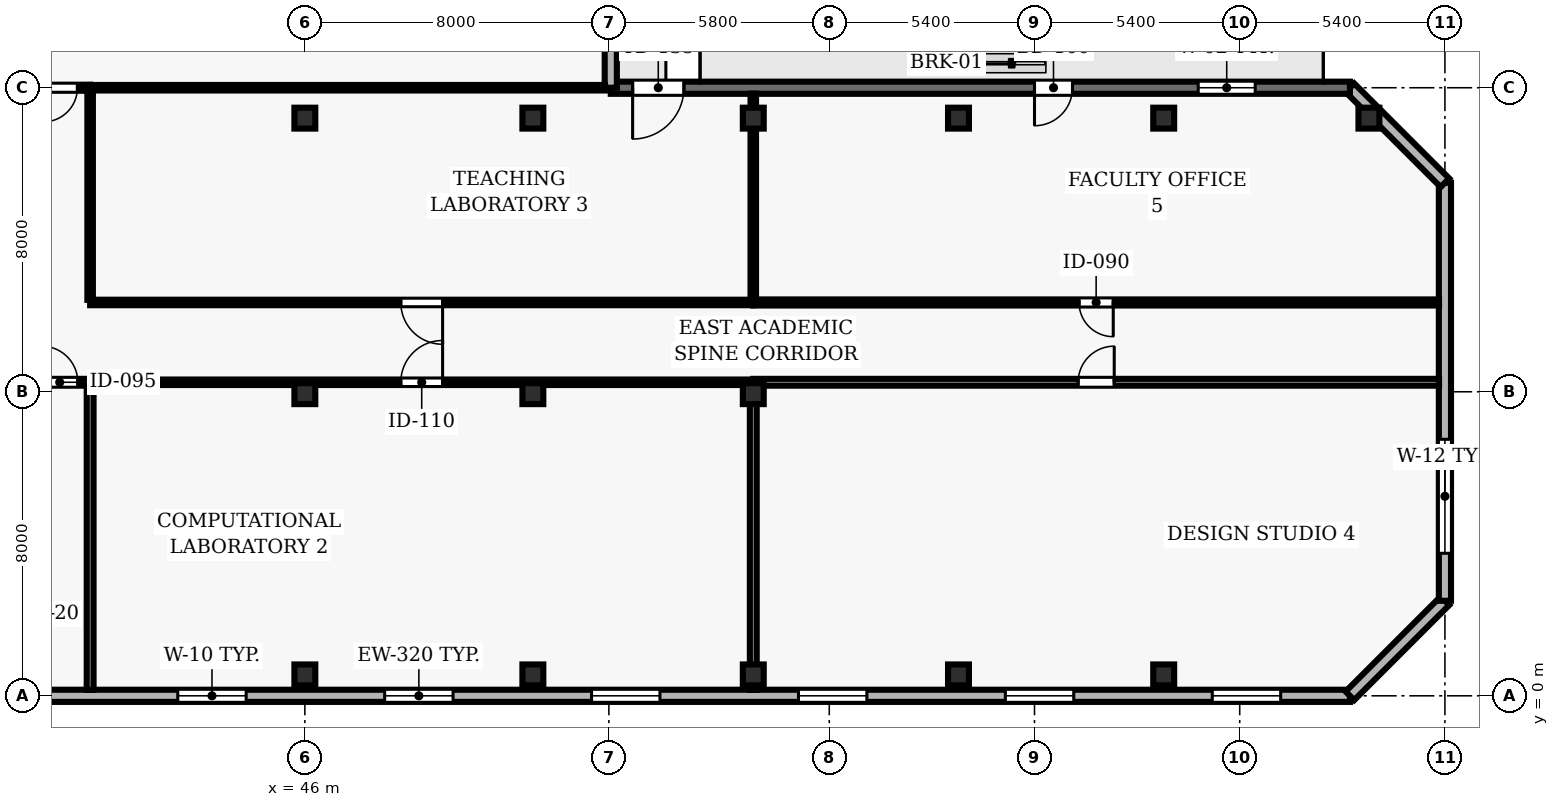
"""IFC4 building model, lengths in metres.
Left out: names, types, materials, properties, quantities, classifications, styles, units other than length and angle.
Written with IfcOpenShell. Run it as: python <this file> out.ifc"""

import sys

from ifc_helpers import new_model, si_unit, direction, frame, frame_2d, origin, origin_2d, place, context, subcontext, project, spatial, rectangle, hollow_rectangle, extrude, element, fill, save


model = new_model("IFC4")
c1 = context("Model", 3, precision=1e-05, world=origin(), true_north=direction((0.0, 1.0)))
c2 = subcontext(c1, "Body", "Model", "MODEL_VIEW")
j1 = project(units=[si_unit("LENGTHUNIT", "METRE"), si_unit("PLANEANGLEUNIT", "RADIAN")], contexts=[c1])
p1 = place(None, origin())
s1 = spatial("IfcSite", under=j1, at=p1, CompositionType="ELEMENT")
p2 = place(p1, origin())
s2 = spatial("IfcBuilding", under=s1, at=p2, CompositionType="ELEMENT")
p3 = place(p2, frame((0.0, 0.0, 42.7)))
s3 = spatial("IfcBuildingStorey", under=s2, at=p3, CompositionType="ELEMENT", Elevation=42.7)
for number, where, z_axis, x_axis in (
    (1, (46.0, 0.55, 0.0), (0.0, 0.0, 1.0), (1.0, 0.0, 0.0)),
    (2, (46.0, 7.95, 0.0), (0.0, 0.0, 1.0), (1.0, 0.0, 0.0)),
    (3, (46.0, 15.2, 0.0), (0.0, 0.0, 1.0), (1.0, 0.0, 0.0)),
    (4, (52.0, 0.55, 0.0), (0.0, 0.0, 1.0), (1.0, 0.0, 0.0)),
    (5, (52.0, 7.95, 0.0), (0.0, 0.0, 1.0), (1.0, 0.0, 0.0)),
    (6, (52.0, 15.2, 0.0), (0.0, 0.0, 1.0), (1.0, 0.0, 0.0)),
    (7, (57.8, 0.55, 0.0), (0.0, 0.0, 1.0), (1.0, 0.0, 0.0)),
    (8, (57.8, 7.95, 0.0), (0.0, 0.0, 1.0), (1.0, 0.0, 0.0)),
    (9, (57.8, 15.2, 0.0), (0.0, 0.0, 1.0), (1.0, 0.0, 0.0)),
    (10, (63.2, 0.55, 0.0), (0.0, 0.0, 1.0), (1.0, 0.0, 0.0)),
    (11, (63.2, 15.2, 0.0), (0.0, 0.0, 1.0), (1.0, 0.0, 0.0)),
    (12, (68.6, 0.55, 0.0), (0.0, 0.0, 1.0), (1.0, 0.0, 0.0)),
    (13, (68.6, 15.2, 0.0), (0.0, 0.0, 1.0), (1.0, 0.0, 0.0)),
    (14, (74.0, 15.2, 0.0), (0.0, 0.0, 1.0), (1.0, 0.0, 0.0)),
):
    element("IfcColumn", number, at=place(p3, frame(where, z_axis=z_axis, x_axis=x_axis)), inside=s3, PredefinedType="COLUMN", context=c2, shape_type="SweptSolid", body=[
        extrude(hollow_rectangle(XDim=0.55, YDim=0.55, WallThickness=0.025, at=origin_2d()), origin(), (0.0, 0.0, 1.0), 3.9),
    ])
p4 = place(p3, frame((24.5, 0.0, 0.0), z_axis=(0.0, 0.0, 1.0), x_axis=(1.0, 0.0, 0.0)))
e15 = element("IfcWall", 15, at=p4, inside=s3, PredefinedType="SOLIDWALL", context=c2, shape_type="SweptSolid", body=[
    extrude(rectangle(XDim=49.0, YDim=0.32, at=frame_2d((24.5, 0.0))), origin(), (0.0, 0.0, 1.0), 3.69),
])
p5 = place(p4, frame((1.822, 0.0, 0.9)))
e16 = element("IfcOpeningElement", 16, at=p5, cuts=e15, PredefinedType="OPENING", context=c2, shape_type="SweptSolid", body=[
    extrude(rectangle(XDim=1.8, YDim=2.2, at=frame_2d((0.9, 1.1))), frame((0.0, 0.17, 0.0), z_axis=(0.0, -1.0, 0.0), x_axis=(1.0, 0.0, 0.0)), (0.0, 0.0, 1.0), 0.34),
])
p6 = place(p4, frame((18.156, 0.0, 0.9)))
e17 = element("IfcOpeningElement", 17, at=p6, cuts=e15, PredefinedType="OPENING", context=c2, shape_type="SweptSolid", body=[
    extrude(rectangle(XDim=1.8, YDim=2.2, at=frame_2d((0.9, 1.1))), frame((0.0, 0.17, 0.0), z_axis=(0.0, -1.0, 0.0), x_axis=(1.0, 0.0, 0.0)), (0.0, 0.0, 1.0), 0.34),
])
p7 = place(p4, frame((23.6, 0.0, 0.9)))
e18 = element("IfcOpeningElement", 18, at=p7, cuts=e15, PredefinedType="OPENING", context=c2, shape_type="SweptSolid", body=[
    extrude(rectangle(XDim=1.8, YDim=2.2, at=frame_2d((0.9, 1.1))), frame((0.0, 0.17, 0.0), z_axis=(0.0, -1.0, 0.0), x_axis=(1.0, 0.0, 0.0)), (0.0, 0.0, 1.0), 0.34),
])
p8 = place(p4, frame((29.044, 0.0, 0.9)))
e19 = element("IfcOpeningElement", 19, at=p8, cuts=e15, PredefinedType="OPENING", context=c2, shape_type="SweptSolid", body=[
    extrude(rectangle(XDim=1.8, YDim=2.2, at=frame_2d((0.9, 1.1))), frame((0.0, 0.17, 0.0), z_axis=(0.0, -1.0, 0.0), x_axis=(1.0, 0.0, 0.0)), (0.0, 0.0, 1.0), 0.34),
])
p9 = place(p4, frame((34.489, 0.0, 0.9)))
e20 = element("IfcOpeningElement", 20, at=p9, cuts=e15, PredefinedType="OPENING", context=c2, shape_type="SweptSolid", body=[
    extrude(rectangle(XDim=1.8, YDim=2.2, at=frame_2d((0.9, 1.1))), frame((0.0, 0.17, 0.0), z_axis=(0.0, -1.0, 0.0), x_axis=(1.0, 0.0, 0.0)), (0.0, 0.0, 1.0), 0.34),
])
p10 = place(p4, frame((39.933, 0.0, 0.9)))
e21 = element("IfcOpeningElement", 21, at=p10, cuts=e15, PredefinedType="OPENING", context=c2, shape_type="SweptSolid", body=[
    extrude(rectangle(XDim=1.8, YDim=2.2, at=frame_2d((0.9, 1.1))), frame((0.0, 0.17, 0.0), z_axis=(0.0, -1.0, 0.0), x_axis=(1.0, 0.0, 0.0)), (0.0, 0.0, 1.0), 0.34),
])
p11 = place(p4, frame((45.378, 0.0, 0.9)))
e22 = element("IfcOpeningElement", 22, at=p11, cuts=e15, PredefinedType="OPENING", context=c2, shape_type="SweptSolid", body=[
    extrude(rectangle(XDim=1.8, YDim=2.2, at=frame_2d((0.9, 1.1))), frame((0.0, 0.17, 0.0), z_axis=(0.0, -1.0, 0.0), x_axis=(1.0, 0.0, 0.0)), (0.0, 0.0, 1.0), 0.34),
])
p12 = place(p3, frame((73.5, 0.0, 0.0), z_axis=(0.0, 0.0, 1.0), x_axis=(0.707106781187, 0.707106781187, 0.0)))
e23 = element("IfcWall", 23, at=p12, inside=s3, PredefinedType="SOLIDWALL", context=c2, shape_type="SweptSolid", body=[
    extrude(rectangle(XDim=3.536, YDim=0.32, at=frame_2d((1.768, 0.0))), origin(), (0.0, 0.0, 1.0), 3.69),
])
p13 = place(p3, frame((76.0, 2.5, 0.0), z_axis=(0.0, 0.0, 1.0), x_axis=(0.0, 1.0, 0.0)))
e24 = element("IfcWall", 24, at=p13, inside=s3, PredefinedType="SOLIDWALL", context=c2, shape_type="SweptSolid", body=[
    extrude(rectangle(XDim=11.0, YDim=0.32, at=frame_2d((5.5, 0.0))), origin(), (0.0, 0.0, 1.0), 3.69),
])
p14 = place(p13, frame((1.25, 0.0, 0.9)))
e25 = element("IfcOpeningElement", 25, at=p14, cuts=e24, PredefinedType="OPENING", context=c2, shape_type="SweptSolid", body=[
    extrude(rectangle(XDim=3.0, YDim=2.2, at=frame_2d((1.5, 1.1))), frame((0.0, 0.17, 0.0), z_axis=(0.0, -1.0, 0.0), x_axis=(1.0, 0.0, 0.0)), (0.0, 0.0, 1.0), 0.34),
])
p15 = place(p3, frame((76.0, 13.5, 0.0), z_axis=(0.0, 0.0, 1.0), x_axis=(-0.707106781187, 0.707106781187, 0.0)))
e26 = element("IfcWall", 26, at=p15, inside=s3, PredefinedType="SOLIDWALL", context=c2, shape_type="SweptSolid", body=[
    extrude(rectangle(XDim=3.536, YDim=0.32, at=frame_2d((1.768, 0.0))), origin(), (0.0, 0.0, 1.0), 3.69),
])
p16 = place(p3, frame((73.5, 16.0, 0.0), z_axis=(0.0, 0.0, 1.0), x_axis=(-1.0, 0.0, 0.0)))
e27 = element("IfcWall", 27, at=p16, inside=s3, PredefinedType="SOLIDWALL", context=c2, shape_type="SweptSolid", body=[
    extrude(rectangle(XDim=19.45, YDim=0.32, at=frame_2d((9.725, 0.0))), origin(), (0.0, 0.0, 1.0), 3.69),
])
p17 = place(p16, frame((7.3, 0.0, 0.0)))
e28 = element("IfcOpeningElement", 28, at=p17, cuts=e27, PredefinedType="OPENING", context=c2, shape_type="SweptSolid", body=[
    extrude(rectangle(XDim=1.0, YDim=2.2, at=frame_2d((0.5, 1.1))), frame((0.0, 0.17, 0.0), z_axis=(0.0, -1.0, 0.0), x_axis=(1.0, 0.0, 0.0)), (0.0, 0.0, 1.0), 0.34),
])
p18 = place(p16, frame((17.525, 0.0, 0.0)))
e29 = element("IfcOpeningElement", 29, at=p18, cuts=e27, PredefinedType="OPENING", context=c2, shape_type="SweptSolid", body=[
    extrude(rectangle(XDim=1.35, YDim=2.2, at=frame_2d((0.675, 1.1))), frame((0.0, 0.17, 0.0), z_axis=(0.0, -1.0, 0.0), x_axis=(1.0, 0.0, 0.0)), (0.0, 0.0, 1.0), 0.34),
])
p19 = place(p16, frame((2.492, 0.0, 0.9)))
e30 = element("IfcOpeningElement", 30, at=p19, cuts=e27, PredefinedType="OPENING", context=c2, shape_type="SweptSolid", body=[
    extrude(rectangle(XDim=1.5, YDim=1.6, at=frame_2d((0.75, 0.8))), frame((0.0, 0.17, 0.0), z_axis=(0.0, -1.0, 0.0), x_axis=(1.0, 0.0, 0.0)), (0.0, 0.0, 1.0), 0.34),
])
p20 = place(p3, frame((54.05, 16.0, 0.0), z_axis=(0.0, 0.0, 1.0), x_axis=(0.0, 1.0, 0.0)))
e31 = element("IfcWall", 31, at=p20, inside=s3, PredefinedType="SOLIDWALL", context=c2, shape_type="SweptSolid", body=[
    extrude(rectangle(XDim=10.747, YDim=0.32, at=frame_2d((5.374, 0.0))), origin(), (0.0, 0.0, 1.0), 3.69),
])
p21 = place(p20, frame((4.473, 0.0, 0.9)))
e32 = element("IfcOpeningElement", 32, at=p21, cuts=e31, PredefinedType="OPENING", context=c2, shape_type="SweptSolid", body=[
    extrude(rectangle(XDim=1.8, YDim=1.6, at=frame_2d((0.9, 0.8))), frame((0.0, 0.17, 0.0), z_axis=(0.0, -1.0, 0.0), x_axis=(1.0, 0.0, 0.0)), (0.0, 0.0, 1.0), 0.34),
])
p22 = place(p3, frame((38.05, 8.25, 0.0), z_axis=(0.0, 0.0, 1.0), x_axis=(1.0, 0.0, 0.0)))
e33 = element("IfcWall", 33, at=p22, inside=s3, PredefinedType="PARTITIONING", context=c2, shape_type="SweptSolid", body=[
    extrude(rectangle(XDim=2.3, YDim=0.18, at=frame_2d((1.15, 0.0))), origin(), (0.0, 0.0, 1.0), 3.055),
])
p23 = place(p22, frame((1.025, 0.0, 0.0)))
e34 = element("IfcOpeningElement", 34, at=p23, cuts=e33, PredefinedType="OPENING", context=c2, shape_type="SweptSolid", body=[
    extrude(rectangle(XDim=0.95, YDim=2.1, at=frame_2d((0.475, 1.05))), frame((0.0, 0.1, 0.0), z_axis=(0.0, -1.0, 0.0), x_axis=(1.0, 0.0, 0.0)), (0.0, 0.0, 1.0), 0.2),
])
p24 = place(p3, frame((40.35, 8.25, 0.0), z_axis=(0.0, 0.0, 1.0), x_axis=(1.0, 0.0, 0.0)))
e35 = element("IfcWall", 35, at=p24, inside=s3, PredefinedType="PARTITIONING", context=c2, shape_type="SweptSolid", body=[
    extrude(rectangle(XDim=17.45, YDim=0.145, at=frame_2d((8.725, 0.0))), origin(), (0.0, 0.0, 1.0), 3.055),
])
p25 = place(p24, frame((8.175, 0.0, 0.0)))
e36 = element("IfcOpeningElement", 36, at=p25, cuts=e35, PredefinedType="OPENING", context=c2, shape_type="SweptSolid", body=[
    extrude(rectangle(XDim=1.1, YDim=2.15, at=frame_2d((0.55, 1.075))), frame((0.0, 0.083, 0.0), z_axis=(0.0, -1.0, 0.0), x_axis=(1.0, 0.0, 0.0)), (0.0, 0.0, 1.0), 0.165),
])
p26 = place(p3, frame((40.35, 16.0, 0.0), z_axis=(0.0, 0.0, 1.0), x_axis=(1.0, 0.0, 0.0)))
e37 = element("IfcWall", 37, at=p26, inside=s3, PredefinedType="PARTITIONING", context=c2, shape_type="SweptSolid", body=[
    extrude(rectangle(XDim=13.545, YDim=0.145, at=frame_2d((6.772, 0.0))), origin(), (0.0, 0.0, 1.0), 3.39),
])
p27 = place(p3, frame((40.35, 16.0, 0.0), z_axis=(0.0, 0.0, 1.0), x_axis=(-1.0, 0.0, 0.0)))
e38 = element("IfcWall", 38, at=p27, inside=s3, PredefinedType="PARTITIONING", context=c2, shape_type="SweptSolid", body=[
    extrude(rectangle(XDim=2.27, YDim=0.16, at=frame_2d((1.135, 0.0))), origin(), (0.0, 0.0, 1.0), 3.69),
])
p28 = place(p27, frame((0.335, 0.0, 0.0)))
e39 = element("IfcOpeningElement", 39, at=p28, cuts=e38, PredefinedType="OPENING", context=c2, shape_type="SweptSolid", body=[
    extrude(rectangle(XDim=0.9, YDim=2.1, at=frame_2d((0.45, 1.05))), frame((0.0, 0.09, 0.0), z_axis=(0.0, -1.0, 0.0), x_axis=(1.0, 0.0, 0.0)), (0.0, 0.0, 1.0), 0.18),
])
p29 = place(p3, frame((57.8, 8.25, 0.0), z_axis=(0.0, 0.0, 1.0), x_axis=(1.0, 0.0, 0.0)))
e40 = element("IfcWall", 40, at=p29, inside=s3, PredefinedType="PARTITIONING", context=c2, shape_type="SweptSolid", body=[
    extrude(rectangle(XDim=18.045, YDim=0.18, at=frame_2d((9.022, 0.0))), origin(), (0.0, 0.0, 1.0), 3.69),
])
p30 = place(p29, frame((8.548, 0.0, 0.0)))
e41 = element("IfcOpeningElement", 41, at=p30, cuts=e40, PredefinedType="OPENING", context=c2, shape_type="SweptSolid", body=[
    extrude(rectangle(XDim=0.95, YDim=2.1, at=frame_2d((0.475, 1.05))), frame((0.0, 0.1, 0.0), z_axis=(0.0, -1.0, 0.0), x_axis=(1.0, 0.0, 0.0)), (0.0, 0.0, 1.0), 0.2),
])
p31 = place(p3, frame((57.8, 10.35, 0.0), z_axis=(0.0, 0.0, 1.0), x_axis=(-1.0, 0.0, 0.0)))
e42 = element("IfcWall", 42, at=p31, inside=s3, PredefinedType="PARTITIONING", context=c2, shape_type="SweptSolid", body=[
    extrude(rectangle(XDim=17.45, YDim=0.145, at=frame_2d((8.725, 0.0))), origin(), (0.0, 0.0, 1.0), 3.277),
])
p32 = place(p31, frame((8.175, 0.0, 0.0)))
e43 = element("IfcOpeningElement", 43, at=p32, cuts=e42, PredefinedType="OPENING", context=c2, shape_type="SweptSolid", body=[
    extrude(rectangle(XDim=1.1, YDim=2.15, at=frame_2d((0.55, 1.075))), frame((0.0, 0.083, 0.0), z_axis=(0.0, -1.0, 0.0), x_axis=(1.0, 0.0, 0.0)), (0.0, 0.0, 1.0), 0.165),
])
p33 = place(p3, frame((75.845, 10.35, 0.0), z_axis=(0.0, 0.0, 1.0), x_axis=(-1.0, 0.0, 0.0)))
e44 = element("IfcWall", 44, at=p33, inside=s3, PredefinedType="PARTITIONING", context=c2, shape_type="SweptSolid", body=[
    extrude(rectangle(XDim=18.045, YDim=0.16, at=frame_2d((9.022, 0.0))), origin(), (0.0, 0.0, 1.0), 3.277),
])
p34 = place(p33, frame((8.573, 0.0, 0.0)))
e45 = element("IfcOpeningElement", 45, at=p34, cuts=e44, PredefinedType="OPENING", context=c2, shape_type="SweptSolid", body=[
    extrude(rectangle(XDim=0.9, YDim=2.1, at=frame_2d((0.45, 1.05))), frame((0.0, 0.09, 0.0), z_axis=(0.0, -1.0, 0.0), x_axis=(1.0, 0.0, 0.0)), (0.0, 0.0, 1.0), 0.18),
])
p35 = place(p3, frame((40.35, 0.155, 0.0), z_axis=(0.0, 0.0, 1.0), x_axis=(0.0, 1.0, 0.0)))
e46 = element("IfcWall", 46, at=p35, inside=s3, PredefinedType="PARTITIONING", context=c2, shape_type="SweptSolid", body=[
    extrude(rectangle(XDim=8.01, YDim=0.18, at=frame_2d((4.005, 0.0))), origin(), (0.0, 0.0, 1.0), 3.69),
])
p36 = place(p3, frame((40.35, 10.418, 0.0), z_axis=(0.0, 0.0, 1.0), x_axis=(0.0, 1.0, 0.0)))
e47 = element("IfcWall", 47, at=p36, inside=s3, PredefinedType="PARTITIONING", context=c2, shape_type="SweptSolid", body=[
    extrude(rectangle(XDim=5.507, YDim=0.145, at=frame_2d((2.753, 0.0))), origin(), (0.0, 0.0, 1.0), 3.277),
])
p37 = place(p3, frame((57.8, 0.155, 0.0), z_axis=(0.0, 0.0, 1.0), x_axis=(0.0, 1.0, 0.0)))
e48 = element("IfcWall", 48, at=p37, inside=s3, PredefinedType="PARTITIONING", context=c2, shape_type="SweptSolid", body=[
    extrude(rectangle(XDim=8.01, YDim=0.18, at=frame_2d((4.005, 0.0))), origin(), (0.0, 0.0, 1.0), 3.055),
])
p38 = place(p3, frame((57.8, 10.425, 0.0), z_axis=(0.0, 0.0, 1.0), x_axis=(0.0, 1.0, 0.0)))
e49 = element("IfcWall", 49, at=p38, inside=s3, PredefinedType="PARTITIONING", context=c2, shape_type="SweptSolid", body=[
    extrude(rectangle(XDim=5.42, YDim=0.145, at=frame_2d((2.71, 0.0))), origin(), (0.0, 0.0, 1.0), 3.055),
])
p39 = place(p6, origin())
e50 = element("IfcWindow", 50, at=p39, inside=s3, PartitioningType="SINGLE_PANEL", PredefinedType="WINDOW", context=c2, shape_type="SweptSolid", body=[
    extrude(rectangle(XDim=1.8, YDim=2.2, at=frame_2d((0.9, 1.1))), frame((0.0, 0.03, 0.0), z_axis=(0.0, -1.0, 0.0), x_axis=(1.0, 0.0, 0.0)), (0.0, 0.0, 1.0), 0.06),
])
fill(e17, e50)
p40 = place(p7, origin())
e51 = element("IfcWindow", 51, at=p40, inside=s3, PartitioningType="SINGLE_PANEL", PredefinedType="WINDOW", context=c2, shape_type="SweptSolid", body=[
    extrude(rectangle(XDim=1.8, YDim=2.2, at=frame_2d((0.9, 1.1))), frame((0.0, 0.03, 0.0), z_axis=(0.0, -1.0, 0.0), x_axis=(1.0, 0.0, 0.0)), (0.0, 0.0, 1.0), 0.06),
])
fill(e18, e51)
p41 = place(p8, origin())
e52 = element("IfcWindow", 52, at=p41, inside=s3, PartitioningType="SINGLE_PANEL", PredefinedType="WINDOW", context=c2, shape_type="SweptSolid", body=[
    extrude(rectangle(XDim=1.8, YDim=2.2, at=frame_2d((0.9, 1.1))), frame((0.0, 0.03, 0.0), z_axis=(0.0, -1.0, 0.0), x_axis=(1.0, 0.0, 0.0)), (0.0, 0.0, 1.0), 0.06),
])
fill(e19, e52)
p42 = place(p9, origin())
e53 = element("IfcWindow", 53, at=p42, inside=s3, PartitioningType="SINGLE_PANEL", PredefinedType="WINDOW", context=c2, shape_type="SweptSolid", body=[
    extrude(rectangle(XDim=1.8, YDim=2.2, at=frame_2d((0.9, 1.1))), frame((0.0, 0.03, 0.0), z_axis=(0.0, -1.0, 0.0), x_axis=(1.0, 0.0, 0.0)), (0.0, 0.0, 1.0), 0.06),
])
fill(e20, e53)
p43 = place(p10, origin())
e54 = element("IfcWindow", 54, at=p43, inside=s3, PartitioningType="SINGLE_PANEL", PredefinedType="WINDOW", context=c2, shape_type="SweptSolid", body=[
    extrude(rectangle(XDim=1.8, YDim=2.2, at=frame_2d((0.9, 1.1))), frame((0.0, 0.03, 0.0), z_axis=(0.0, -1.0, 0.0), x_axis=(1.0, 0.0, 0.0)), (0.0, 0.0, 1.0), 0.06),
])
fill(e21, e54)
p44 = place(p11, origin())
e55 = element("IfcWindow", 55, at=p44, inside=s3, PartitioningType="SINGLE_PANEL", PredefinedType="WINDOW", context=c2, shape_type="SweptSolid", body=[
    extrude(rectangle(XDim=1.8, YDim=2.2, at=frame_2d((0.9, 1.1))), frame((0.0, 0.03, 0.0), z_axis=(0.0, -1.0, 0.0), x_axis=(1.0, 0.0, 0.0)), (0.0, 0.0, 1.0), 0.06),
])
fill(e22, e55)
p45 = place(p14, origin())
e56 = element("IfcWindow", 56, at=p45, inside=s3, PartitioningType="SINGLE_PANEL", PredefinedType="WINDOW", context=c2, shape_type="SweptSolid", body=[
    extrude(rectangle(XDim=3.0, YDim=2.2, at=frame_2d((1.5, 1.1))), frame((0.0, 0.03, 0.0), z_axis=(0.0, -1.0, 0.0), x_axis=(1.0, 0.0, 0.0)), (0.0, 0.0, 1.0), 0.06),
])
fill(e25, e56)
p46 = place(p17, origin())
e57 = element("IfcDoor", 57, at=p46, inside=s3, OperationType="SINGLE_SWING_RIGHT", PredefinedType="DOOR", context=c2, shape_type="SweptSolid", body=[
    extrude(rectangle(XDim=1.0, YDim=2.2, at=frame_2d((0.5, 1.1))), frame((0.0, 0.025, 0.0), z_axis=(0.0, -1.0, 0.0), x_axis=(1.0, 0.0, 0.0)), (0.0, 0.0, 1.0), 0.05),
])
fill(e28, e57)
p47 = place(p18, origin())
e58 = element("IfcDoor", 58, at=p47, inside=s3, OperationType="SINGLE_SWING_RIGHT", PredefinedType="DOOR", context=c2, shape_type="SweptSolid", body=[
    extrude(rectangle(XDim=1.35, YDim=2.2, at=frame_2d((0.675, 1.1))), frame((0.0, 0.025, 0.0), z_axis=(0.0, -1.0, 0.0), x_axis=(1.0, 0.0, 0.0)), (0.0, 0.0, 1.0), 0.05),
])
fill(e29, e58)
p48 = place(p19, origin())
e59 = element("IfcWindow", 59, at=p48, inside=s3, PartitioningType="SINGLE_PANEL", PredefinedType="WINDOW", context=c2, shape_type="SweptSolid", body=[
    extrude(rectangle(XDim=1.5, YDim=1.6, at=frame_2d((0.75, 0.8))), frame((0.0, 0.03, 0.0), z_axis=(0.0, -1.0, 0.0), x_axis=(1.0, 0.0, 0.0)), (0.0, 0.0, 1.0), 0.06),
])
fill(e30, e59)
p49 = place(p23, origin())
e60 = element("IfcDoor", 60, at=p49, inside=s3, OperationType="SINGLE_SWING_LEFT", PredefinedType="DOOR", context=c2, shape_type="SweptSolid", body=[
    extrude(rectangle(XDim=0.95, YDim=2.1, at=frame_2d((0.475, 1.05))), frame((0.0, 0.025, 0.0), z_axis=(0.0, -1.0, 0.0), x_axis=(1.0, 0.0, 0.0)), (0.0, 0.0, 1.0), 0.05),
])
fill(e34, e60)
p50 = place(p25, origin())
e61 = element("IfcDoor", 61, at=p50, inside=s3, OperationType="SINGLE_SWING_RIGHT", PredefinedType="DOOR", context=c2, shape_type="SweptSolid", body=[
    extrude(rectangle(XDim=1.1, YDim=2.15, at=frame_2d((0.55, 1.075))), frame((0.0, 0.025, 0.0), z_axis=(0.0, -1.0, 0.0), x_axis=(1.0, 0.0, 0.0)), (0.0, 0.0, 1.0), 0.05),
])
fill(e36, e61)
p51 = place(p32, origin())
e62 = element("IfcDoor", 62, at=p51, inside=s3, OperationType="SINGLE_SWING_LEFT", PredefinedType="DOOR", context=c2, shape_type="SweptSolid", body=[
    extrude(rectangle(XDim=1.1, YDim=2.15, at=frame_2d((0.55, 1.075))), frame((0.0, 0.025, 0.0), z_axis=(0.0, -1.0, 0.0), x_axis=(1.0, 0.0, 0.0)), (0.0, 0.0, 1.0), 0.05),
])
fill(e43, e62)
p52 = place(p30, origin())
e63 = element("IfcDoor", 63, at=p52, inside=s3, OperationType="SINGLE_SWING_RIGHT", PredefinedType="DOOR", context=c2, shape_type="SweptSolid", body=[
    extrude(rectangle(XDim=0.95, YDim=2.1, at=frame_2d((0.475, 1.05))), frame((0.0, 0.025, 0.0), z_axis=(0.0, -1.0, 0.0), x_axis=(1.0, 0.0, 0.0)), (0.0, 0.0, 1.0), 0.05),
])
fill(e41, e63)
p53 = place(p34, origin())
e64 = element("IfcDoor", 64, at=p53, inside=s3, OperationType="SINGLE_SWING_LEFT", PredefinedType="DOOR", context=c2, shape_type="SweptSolid", body=[
    extrude(rectangle(XDim=0.9, YDim=2.1, at=frame_2d((0.45, 1.05))), frame((0.0, 0.025, 0.0), z_axis=(0.0, -1.0, 0.0), x_axis=(1.0, 0.0, 0.0)), (0.0, 0.0, 1.0), 0.05),
])
fill(e45, e64)
p54 = place(p28, origin())
e65 = element("IfcDoor", 65, at=p54, inside=s3, OperationType="SINGLE_SWING_RIGHT", PredefinedType="DOOR", context=c2, shape_type="SweptSolid", body=[
    extrude(rectangle(XDim=0.9, YDim=2.1, at=frame_2d((0.45, 1.05))), frame((0.0, 0.025, 0.0), z_axis=(0.0, -1.0, 0.0), x_axis=(1.0, 0.0, 0.0)), (0.0, 0.0, 1.0), 0.05),
])
fill(e39, e65)
save(model, sys.argv[1])
